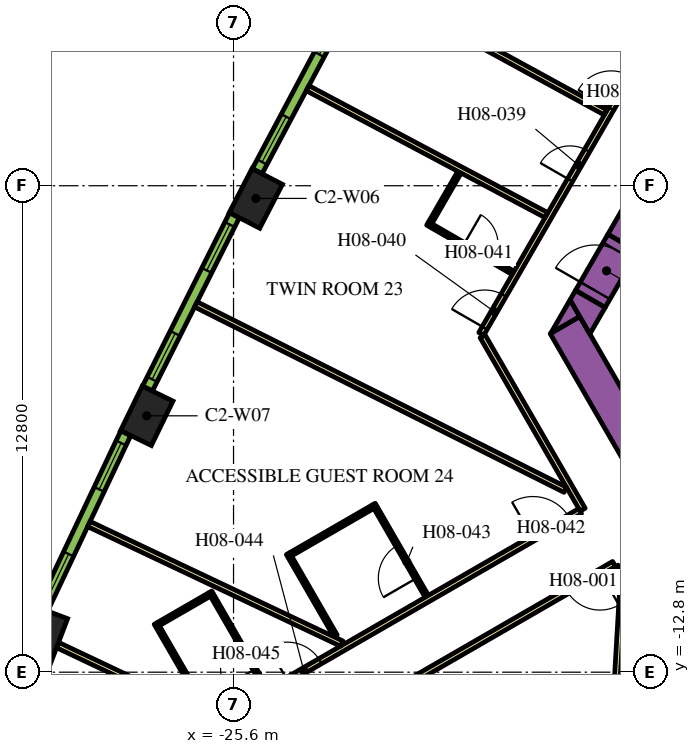
"""IFC4 building model, lengths in metres.
Left out: names, types, materials, properties, quantities, classifications, styles, units other than length and angle.
Written with IfcOpenShell. Run it as: python <this file> out.ifc"""

import sys

from ifc_helpers import new_model, si_unit, direction, frame, frame_2d, origin, origin_2d, place, context, subcontext, project, spatial, polyline, rectangle, outline, extrude, element, fill, save


model = new_model("IFC4")
c1 = context("Model", 3, precision=1e-05, world=origin(), true_north=direction((0.0, 1.0)))
c2 = subcontext(c1, "Body", "Model", "MODEL_VIEW")
j1 = project(units=[si_unit("LENGTHUNIT", "METRE"), si_unit("PLANEANGLEUNIT", "RADIAN")], contexts=[c1])
p1 = place(None, origin())
s1 = spatial("IfcSite", under=j1, at=p1, CompositionType="ELEMENT")
p2 = place(p1, origin())
s2 = spatial("IfcBuilding", under=s1, at=p2, CompositionType="ELEMENT")
p3 = place(p2, frame((0.0, 0.0, 114.9)))
s3 = spatial("IfcBuildingStorey", under=s2, at=p3, CompositionType="ELEMENT", Elevation=114.9)
for number, where, z_axis, x_axis in (
    (1, (-25.012, -0.334, 0.0), (0.0, 0.0, 1.0), (-0.459, -0.888, 0.0)),
    (2, (-27.883, -6.054, 0.0), (0.0, 0.0, 1.0), (-0.438, -0.899, 0.0)),
    (3, (-30.619, -11.839, 0.0), (0.0, 0.0, 1.0), (-0.355, -0.935, 0.0)),
):
    element("IfcColumn", number, at=place(p3, frame(where, z_axis=z_axis, x_axis=x_axis)), inside=s3, PredefinedType="COLUMN", context=c2, shape_type="SweptSolid", body=[
        extrude(rectangle(XDim=1.3, YDim=0.9, at=origin_2d()), origin(), (0.0, 0.0, 1.0), 3.9),
    ])
p4 = place(p3, frame((-15.36, -1.503, 0.0), z_axis=(0.0, 0.0, 1.0), x_axis=(0.50000389221, 0.866023156604, 0.0)))
e4 = element("IfcWall", 4, at=p4, inside=s3, PredefinedType="SOLIDWALL", context=c2, shape_type="SweptSolid", body=[
    extrude(rectangle(XDim=21.0, YDim=0.9, at=frame_2d((10.5, 0.0))), origin(), (0.0, 0.0, 1.0), 3.9),
])
p5 = place(p3, frame((-12.134, -11.883, 0.0), z_axis=(0.0, 0.0, 1.0), x_axis=(-0.500005339912, 0.866022320763, 0.0)))
e5 = element("IfcWall", 5, at=p5, inside=s3, PredefinedType="SOLIDWALL", context=c2, shape_type="SweptSolid", body=[
    extrude(rectangle(XDim=9.488, YDim=0.9, at=frame_2d((4.744, 0.0))), origin(), (0.0, 0.0, 1.0), 3.9),
])
p6 = place(p3, origin())
e6 = element("IfcWall", 6, at=p6, inside=s3, PredefinedType="SOLIDWALL", context=c2, shape_type="SweptSolid", body=[
    extrude(outline(polyline([(-16.489, -3.44), (-17.251, -3.88), (-16.743, -3.0), (-16.489, -3.44)])), origin(), (0.0, 0.0, 1.0), 3.9),
])
e7 = element("IfcWall", 7, at=p6, inside=s3, PredefinedType="SOLIDWALL", context=c2, shape_type="SweptSolid", body=[
    extrude(outline(polyline([(-15.82, -3.201), (-16.223, -3.9), (-16.743, -3.0), (-16.599, -2.751), (-15.82, -3.201)])), origin(), (0.0, 0.0, 1.0), 3.9),
])
p7 = place(p3, frame((-16.209, -2.976, 0.0), z_axis=(0.0, 0.0, 1.0), x_axis=(0.499954529098, 0.86605165483, 0.0)))
e8 = element("IfcWall", 8, at=p7, inside=s3, PredefinedType="SOLIDWALL", context=c2, shape_type="SweptSolid", body=[
    extrude(rectangle(XDim=1.7, YDim=0.9, at=frame_2d((0.85, 0.0))), origin(), (0.0, 0.0, 1.0), 3.9),
])
p8 = place(p7, frame((0.25, 0.0, 0.0)))
e9 = element("IfcOpeningElement", 9, at=p8, cuts=e8, PredefinedType="OPENING", context=c2, shape_type="SweptSolid", body=[
    extrude(rectangle(XDim=1.2, YDim=2.1, at=frame_2d((0.6, 1.05))), frame((0.0, 0.46, 0.0), z_axis=(0.0, -1.0, 0.0), x_axis=(1.0, 0.0, 0.0)), (0.0, 0.0, 1.0), 0.92),
])
p9 = place(p3, frame((-19.081, -3.9, 0.0), z_axis=(0.0, 0.0, 1.0), x_axis=(0.499998313975, 0.866026377209, 0.0)))
e10 = element("IfcWall", 10, at=p9, inside=s3, PredefinedType="PARTITIONING", context=c2, shape_type="SweptSolid", body=[
    extrude(rectangle(XDim=25.766, YDim=0.15, at=frame_2d((12.883, 0.0))), origin(), (0.0, 0.0, 1.0), 2.75),
])
p10 = place(p9, frame((19.306, 0.0, 0.0)))
e11 = element("IfcOpeningElement", 11, at=p10, cuts=e10, PredefinedType="OPENING", context=c2, shape_type="SweptSolid", body=[
    extrude(rectangle(XDim=1.0, YDim=2.1, at=frame_2d((0.5, 1.05))), frame((0.0, 0.085, 0.0), z_axis=(0.0, -1.0, 0.0), x_axis=(1.0, 0.0, 0.0)), (0.0, 0.0, 1.0), 0.17),
])
p11 = place(p9, frame((18.0, 0.0, 0.0)))
e12 = element("IfcOpeningElement", 12, at=p11, cuts=e10, PredefinedType="OPENING", context=c2, shape_type="SweptSolid", body=[
    extrude(rectangle(XDim=1.0, YDim=2.1, at=frame_2d((0.5, 1.05))), frame((0.0, 0.085, 0.0), z_axis=(0.0, -1.0, 0.0), x_axis=(1.0, 0.0, 0.0)), (0.0, 0.0, 1.0), 0.17),
])
p12 = place(p9, frame((6.838, 0.0, 0.0)))
e13 = element("IfcOpeningElement", 13, at=p12, cuts=e10, PredefinedType="OPENING", context=c2, shape_type="SweptSolid", body=[
    extrude(rectangle(XDim=1.0, YDim=2.1, at=frame_2d((0.5, 1.05))), frame((0.0, 0.085, 0.0), z_axis=(0.0, -1.0, 0.0), x_axis=(1.0, 0.0, 0.0)), (0.0, 0.0, 1.0), 0.17),
])
p13 = place(p9, frame((4.674, 0.0, 0.0)))
e14 = element("IfcOpeningElement", 14, at=p13, cuts=e10, PredefinedType="OPENING", context=c2, shape_type="SweptSolid", body=[
    extrude(rectangle(XDim=0.9, YDim=2.1, at=frame_2d((0.45, 1.05))), frame((0.0, 0.085, 0.0), z_axis=(0.0, -1.0, 0.0), x_axis=(1.0, 0.0, 0.0)), (0.0, 0.0, 1.0), 0.17),
])
p14 = place(p9, frame((0.18, 0.0, 0.0)))
e15 = element("IfcOpeningElement", 15, at=p14, cuts=e10, PredefinedType="OPENING", context=c2, shape_type="SweptSolid", body=[
    extrude(rectangle(XDim=1.0, YDim=2.1, at=frame_2d((0.5, 1.05))), frame((0.0, 0.085, 0.0), z_axis=(0.0, -1.0, 0.0), x_axis=(1.0, 0.0, 0.0)), (0.0, 0.0, 1.0), 0.17),
])
p15 = place(p3, frame((-16.412, -8.523, 0.0), z_axis=(0.0, 0.0, 1.0), x_axis=(-0.500001929737, 0.866024289647, 0.0)))
e16 = element("IfcWall", 16, at=p15, inside=s3, PredefinedType="PARTITIONING", context=c2, shape_type="SweptSolid", body=[
    extrude(rectangle(XDim=5.268, YDim=0.15, at=frame_2d((2.634, 0.0))), origin(), (0.0, 0.0, 1.0), 2.75),
])
p16 = place(p3, frame((-28.211, -15.335, 0.0), z_axis=(0.0, 0.0, 1.0), x_axis=(0.866025884867, 0.49999916674, 0.0)))
e17 = element("IfcWall", 17, at=p16, inside=s3, PredefinedType="PARTITIONING", context=c2, shape_type="SweptSolid", body=[
    extrude(rectangle(XDim=13.543, YDim=0.15, at=frame_2d((6.772, 0.0))), origin(), (0.0, 0.0, 1.0), 2.75),
])
p17 = place(p16, frame((12.114, 0.0, 0.0)))
e18 = element("IfcOpeningElement", 18, at=p17, cuts=e17, PredefinedType="OPENING", context=c2, shape_type="SweptSolid", body=[
    extrude(rectangle(XDim=1.1, YDim=2.1, at=frame_2d((0.55, 1.05))), frame((0.0, 0.085, 0.0), z_axis=(0.0, -1.0, 0.0), x_axis=(1.0, 0.0, 0.0)), (0.0, 0.0, 1.0), 0.17),
])
p18 = place(p16, frame((4.65, 0.0, 0.0)))
e19 = element("IfcOpeningElement", 19, at=p18, cuts=e17, PredefinedType="OPENING", context=c2, shape_type="SweptSolid", body=[
    extrude(rectangle(XDim=1.0, YDim=2.1, at=frame_2d((0.5, 1.05))), frame((0.0, 0.085, 0.0), z_axis=(0.0, -1.0, 0.0), x_axis=(1.0, 0.0, 0.0)), (0.0, 0.0, 1.0), 0.17),
])
p19 = place(p3, frame((-15.587, -9.952, 0.0), z_axis=(0.0, 0.0, 1.0), x_axis=(-0.866017869832, -0.500013048961, 0.0)))
e20 = element("IfcWall", 20, at=p19, inside=s3, PredefinedType="PARTITIONING", context=c2, shape_type="SweptSolid", body=[
    extrude(rectangle(XDim=13.624, YDim=0.15, at=frame_2d((6.812, 0.0))), origin(), (0.0, 0.0, 1.0), 2.75),
])
p20 = place(p19, frame((0.427, 0.0, 0.0)))
e21 = element("IfcOpeningElement", 21, at=p20, cuts=e20, PredefinedType="OPENING", context=c2, shape_type="SweptSolid", body=[
    extrude(rectangle(XDim=1.0, YDim=2.1, at=frame_2d((0.5, 1.05))), frame((0.0, 0.085, 0.0), z_axis=(0.0, -1.0, 0.0), x_axis=(1.0, 0.0, 0.0)), (0.0, 0.0, 1.0), 0.17),
])
p21 = place(p3, frame((-12.918, -14.575, 0.0), z_axis=(0.0, 0.0, 1.0), x_axis=(-0.500009150678, 0.866020120573, 0.0)))
e22 = element("IfcWall", 22, at=p21, inside=s3, PredefinedType="PARTITIONING", context=c2, shape_type="SweptSolid", body=[
    extrude(rectangle(XDim=5.258, YDim=0.15, at=frame_2d((2.629, 0.0))), origin(), (0.0, 0.0, 1.0), 2.75),
])
p22 = place(p3, frame((-30.231, -12.085, 0.0), z_axis=(0.0, 0.0, 1.0), x_axis=(0.904001132572, -0.427530060122, 0.0)))
e23 = element("IfcWall", 23, at=p22, inside=s3, PredefinedType="PARTITIONING", context=c2, shape_type="SweptSolid", body=[
    extrude(rectangle(XDim=4.51, YDim=0.15, at=frame_2d((2.255, 0.0))), origin(), (0.0, 0.0, 1.0), 2.75),
])
p23 = place(p3, frame((-29.406, -8.901, 0.0), z_axis=(0.0, 0.0, 1.0), x_axis=(0.904002363742, -0.427527456836, 0.0)))
e24 = element("IfcWall", 24, at=p23, inside=s3, PredefinedType="PARTITIONING", context=c2, shape_type="SweptSolid", body=[
    extrude(rectangle(XDim=7.362, YDim=0.15, at=frame_2d((3.681, 0.0))), origin(), (0.0, 0.0, 1.0), 2.75),
])
p24 = place(p3, frame((-23.652, 2.567, 0.0), z_axis=(0.0, 0.0, 1.0), x_axis=(0.883019237957, -0.469336793144, 0.0)))
e25 = element("IfcWall", 25, at=p24, inside=s3, PredefinedType="PARTITIONING", context=c2, shape_type="SweptSolid", body=[
    extrude(rectangle(XDim=7.111, YDim=0.15, at=frame_2d((3.555, 0.0))), origin(), (0.0, 0.0, 1.0), 2.75),
])
p25 = place(p3, frame((-26.591, -3.122, 0.0), z_axis=(0.0, 0.0, 1.0), x_axis=(0.893766213273, -0.448533115847, 0.0)))
e26 = element("IfcWall", 26, at=p25, inside=s3, PredefinedType="PARTITIONING", context=c2, shape_type="SweptSolid", body=[
    extrude(rectangle(XDim=10.875, YDim=0.15, at=frame_2d((5.438, 0.0))), origin(), (0.0, 0.0, 1.0), 2.75),
])
p26 = place(p3, frame((-21.614, 5.102, 0.0), z_axis=(0.0, 0.0, 1.0), x_axis=(0.877484555087, -0.479604895287, 0.0)))
e27 = element("IfcWall", 27, at=p26, inside=s3, PredefinedType="PARTITIONING", context=c2, shape_type="SweptSolid", body=[
    extrude(rectangle(XDim=6.611, YDim=0.15, at=frame_2d((3.306, 0.0))), origin(), (0.0, 0.0, 1.0), 2.75),
])
p27 = place(p3, frame((-15.999, -21.467, 0.0), z_axis=(0.0, 0.0, 1.0), x_axis=(0.058411453297, 0.998292593443, 0.0)))
e28 = element("IfcWall", 28, at=p27, inside=s3, PredefinedType="PARTITIONING", context=c2, shape_type="SweptSolid", body=[
    extrude(rectangle(XDim=10.875, YDim=0.15, at=frame_2d((5.438, 0.0))), origin(), (0.0, 0.0, 1.0), 2.75),
])
p28 = place(p3, frame((-20.492, -0.994, 0.0), z_axis=(0.0, 0.0, 1.0), x_axis=(0.865997922154, -0.500047596559, 0.0)))
e29 = element("IfcWall", 29, at=p28, inside=s3, PredefinedType="PARTITIONING", context=c2, shape_type="SweptSolid", body=[
    extrude(rectangle(XDim=2.6, YDim=0.1, at=frame_2d((1.3, 0.0))), origin(), (0.0, 0.0, 1.0), 2.75),
])
p29 = place(p28, frame((1.1, 0.0, 0.0)))
e30 = element("IfcOpeningElement", 30, at=p29, cuts=e29, PredefinedType="OPENING", context=c2, shape_type="SweptSolid", body=[
    extrude(rectangle(XDim=0.9, YDim=2.1, at=frame_2d((0.45, 1.05))), frame((0.0, 0.06, 0.0), z_axis=(0.0, -1.0, 0.0), x_axis=(1.0, 0.0, 0.0)), (0.0, 0.0, 1.0), 0.12),
])
p30 = place(p3, frame((-20.424, -0.976, 0.0), z_axis=(0.0, 0.0, 1.0), x_axis=(0.500086174919, 0.865975644955, 0.0)))
e31 = element("IfcWall", 31, at=p30, inside=s3, PredefinedType="PARTITIONING", context=c2, shape_type="SweptSolid", body=[
    extrude(rectangle(XDim=1.53, YDim=0.1, at=frame_2d((0.765, 0.0))), origin(), (0.0, 0.0, 1.0), 2.75),
])
p31 = place(p3, frame((-20.515, -10.805, 0.0), z_axis=(0.0, 0.0, 1.0), x_axis=(-0.49994636267, 0.866056369097, 0.0)))
e32 = element("IfcWall", 32, at=p31, inside=s3, PredefinedType="PARTITIONING", context=c2, shape_type="SweptSolid", body=[
    extrude(rectangle(XDim=2.8, YDim=0.1, at=frame_2d((1.4, 0.0))), origin(), (0.0, 0.0, 1.0), 2.75),
])
p32 = place(p31, frame((0.55, 0.0, 0.0)))
e33 = element("IfcOpeningElement", 33, at=p32, cuts=e32, PredefinedType="OPENING", context=c2, shape_type="SweptSolid", body=[
    extrude(rectangle(XDim=1.0, YDim=2.1, at=frame_2d((0.5, 1.05))), frame((0.0, 0.06, 0.0), z_axis=(0.0, -1.0, 0.0), x_axis=(1.0, 0.0, 0.0)), (0.0, 0.0, 1.0), 0.12),
])
for number, where, z_axis, x_axis in (
    (34, (-21.933, -8.448, 0.0), (0.0, 0.0, 1.0), (-0.866, -0.5, 0.0)),
    (35, (-22.916, -11.845, 0.0), (0.0, 0.0, 1.0), (-0.5, 0.866, 0.0)),
):
    element("IfcWall", number, at=place(p3, frame(where, z_axis=z_axis, x_axis=x_axis)), inside=s3, PredefinedType="PARTITIONING", context=c2, shape_type="SweptSolid", body=[
        extrude(rectangle(XDim=2.5, YDim=0.1, at=frame_2d((1.25, 0.0))), origin(), (0.0, 0.0, 1.0), 2.75),
    ])
p33 = place(p3, frame((-24.74, -13.244, 0.0), z_axis=(0.0, 0.0, 1.0), x_axis=(-0.500037662692, 0.866003658127, 0.0)))
e36 = element("IfcWall", 36, at=p33, inside=s3, PredefinedType="PARTITIONING", context=c2, shape_type="SweptSolid", body=[
    extrude(rectangle(XDim=2.95, YDim=0.1, at=frame_2d((1.475, 0.0))), origin(), (0.0, 0.0, 1.0), 2.75),
])
p34 = place(p33, frame((0.6, 0.0, 0.0)))
e37 = element("IfcOpeningElement", 37, at=p34, cuts=e36, PredefinedType="OPENING", context=c2, shape_type="SweptSolid", body=[
    extrude(rectangle(XDim=0.9, YDim=2.1, at=frame_2d((0.45, 1.05))), frame((0.0, 0.06, 0.0), z_axis=(0.0, -1.0, 0.0), x_axis=(1.0, 0.0, 0.0)), (0.0, 0.0, 1.0), 0.12),
])
p35 = place(p3, frame((-26.233, -10.758, 0.0), z_axis=(0.0, 0.0, 1.0), x_axis=(-0.866043940782, -0.499967891604, 0.0)))
e38 = element("IfcWall", 38, at=p35, inside=s3, PredefinedType="PARTITIONING", context=c2, shape_type="SweptSolid", body=[
    extrude(rectangle(XDim=1.55, YDim=0.1, at=frame_2d((0.775, 0.0))), origin(), (0.0, 0.0, 1.0), 2.75),
])
p36 = place(p3, frame((-26.319, -13.81, 0.0), z_axis=(0.0, 0.0, 1.0), x_axis=(-0.499953715521, 0.866052124492, 0.0)))
e39 = element("IfcWall", 39, at=p36, inside=s3, PredefinedType="PARTITIONING", context=c2, shape_type="SweptSolid", body=[
    extrude(rectangle(XDim=2.65, YDim=0.1, at=frame_2d((1.325, 0.0))), origin(), (0.0, 0.0, 1.0), 2.75),
])
p37 = place(p3, frame((-22.583, 4.887, 0.0), z_axis=(0.0, 0.0, 1.0), x_axis=(-0.469323203119, -0.883026461106, 0.0)))
e40 = element("IfcWall", 40, at=p37, inside=s3, PredefinedType="SOLIDWALL", context=c2, shape_type="SweptSolid", body=[
    extrude(rectangle(XDim=5.101, YDim=0.29, at=frame_2d((2.55, 0.0))), origin(), (0.0, 0.0, 1.0), 3.65),
])
p38 = place(p37, frame((0.273, 0.0, 0.9)))
e41 = element("IfcOpeningElement", 41, at=p38, cuts=e40, PredefinedType="OPENING", context=c2, shape_type="SweptSolid", body=[
    extrude(rectangle(XDim=1.35, YDim=2.15, at=frame_2d((0.675, 1.075))), frame((0.0, 0.155, 0.0), z_axis=(0.0, -1.0, 0.0), x_axis=(1.0, 0.0, 0.0)), (0.0, 0.0, 1.0), 0.31),
])
p39 = place(p37, frame((3.478, 0.0, 0.9)))
e42 = element("IfcOpeningElement", 42, at=p39, cuts=e40, PredefinedType="OPENING", context=c2, shape_type="SweptSolid", body=[
    extrude(rectangle(XDim=1.35, YDim=2.15, at=frame_2d((0.675, 1.075))), frame((0.0, 0.155, 0.0), z_axis=(0.0, -1.0, 0.0), x_axis=(1.0, 0.0, 0.0)), (0.0, 0.0, 1.0), 0.31),
])
p40 = place(p3, frame((-25.576, -0.778, 0.0), z_axis=(0.0, 0.0, 1.0), x_axis=(-0.448534297211, -0.893765620409, 0.0)))
e43 = element("IfcWall", 43, at=p40, inside=s3, PredefinedType="SOLIDWALL", context=c2, shape_type="SweptSolid", body=[
    extrude(rectangle(XDim=5.1, YDim=0.29, at=frame_2d((2.55, 0.0))), origin(), (0.0, 0.0, 1.0), 3.65),
])
p41 = place(p40, frame((0.272, 0.0, 0.9)))
e44 = element("IfcOpeningElement", 44, at=p41, cuts=e43, PredefinedType="OPENING", context=c2, shape_type="SweptSolid", body=[
    extrude(rectangle(XDim=1.35, YDim=2.15, at=frame_2d((0.675, 1.075))), frame((0.0, 0.155, 0.0), z_axis=(0.0, -1.0, 0.0), x_axis=(1.0, 0.0, 0.0)), (0.0, 0.0, 1.0), 0.31),
])
p42 = place(p40, frame((3.478, 0.0, 0.9)))
e45 = element("IfcOpeningElement", 45, at=p42, cuts=e43, PredefinedType="OPENING", context=c2, shape_type="SweptSolid", body=[
    extrude(rectangle(XDim=1.35, YDim=2.15, at=frame_2d((0.675, 1.075))), frame((0.0, 0.155, 0.0), z_axis=(0.0, -1.0, 0.0), x_axis=(1.0, 0.0, 0.0)), (0.0, 0.0, 1.0), 0.31),
])
p43 = place(p3, frame((-28.436, -6.511, 0.0), z_axis=(0.0, 0.0, 1.0), x_axis=(-0.427543726596, -0.903994669148, 0.0)))
e46 = element("IfcWall", 46, at=p43, inside=s3, PredefinedType="SOLIDWALL", context=c2, shape_type="SweptSolid", body=[
    extrude(rectangle(XDim=5.107, YDim=0.29, at=frame_2d((2.553, 0.0))), origin(), (0.0, 0.0, 1.0), 3.65),
])
p44 = place(p43, frame((0.285, 0.0, 0.9)))
e47 = element("IfcOpeningElement", 47, at=p44, cuts=e46, PredefinedType="OPENING", context=c2, shape_type="SweptSolid", body=[
    extrude(rectangle(XDim=1.35, YDim=2.15, at=frame_2d((0.675, 1.075))), frame((0.0, 0.155, 0.0), z_axis=(0.0, -1.0, 0.0), x_axis=(1.0, 0.0, 0.0)), (0.0, 0.0, 1.0), 0.31),
])
p45 = place(p43, frame((3.516, 0.0, 0.9)))
e48 = element("IfcOpeningElement", 48, at=p45, cuts=e46, PredefinedType="OPENING", context=c2, shape_type="SweptSolid", body=[
    extrude(rectangle(XDim=1.35, YDim=2.15, at=frame_2d((0.675, 1.075))), frame((0.0, 0.155, 0.0), z_axis=(0.0, -1.0, 0.0), x_axis=(1.0, 0.0, 0.0)), (0.0, 0.0, 1.0), 0.31),
])
p46 = place(p8, origin())
e49 = element("IfcDoor", 49, at=p46, inside=s3, OperationType="SINGLE_SWING_LEFT", PredefinedType="DOOR", context=c2, shape_type="SweptSolid", body=[
    extrude(rectangle(XDim=1.2, YDim=2.1, at=frame_2d((0.6, 1.05))), frame((0.0, 0.025, 0.0), z_axis=(0.0, -1.0, 0.0), x_axis=(1.0, 0.0, 0.0)), (0.0, 0.0, 1.0), 0.05),
])
fill(e9, e49)
p47 = place(p20, origin())
e50 = element("IfcDoor", 50, at=p47, inside=s3, OperationType="SINGLE_SWING_LEFT", PredefinedType="DOOR", context=c2, shape_type="SweptSolid", body=[
    extrude(rectangle(XDim=1.0, YDim=2.1, at=frame_2d((0.5, 1.05))), frame((0.0, 0.025, 0.0), z_axis=(0.0, -1.0, 0.0), x_axis=(1.0, 0.0, 0.0)), (0.0, 0.0, 1.0), 0.05),
])
fill(e21, e50)
p48 = place(p12, origin())
e51 = element("IfcDoor", 51, at=p48, inside=s3, OperationType="SINGLE_SWING_LEFT", PredefinedType="DOOR", context=c2, shape_type="SweptSolid", body=[
    extrude(rectangle(XDim=1.0, YDim=2.1, at=frame_2d((0.5, 1.05))), frame((0.0, 0.025, 0.0), z_axis=(0.0, -1.0, 0.0), x_axis=(1.0, 0.0, 0.0)), (0.0, 0.0, 1.0), 0.05),
])
fill(e13, e51)
p49 = place(p13, origin())
e52 = element("IfcDoor", 52, at=p49, inside=s3, OperationType="SINGLE_SWING_RIGHT", PredefinedType="DOOR", context=c2, shape_type="SweptSolid", body=[
    extrude(rectangle(XDim=0.9, YDim=2.1, at=frame_2d((0.45, 1.05))), frame((0.0, 0.025, 0.0), z_axis=(0.0, -1.0, 0.0), x_axis=(1.0, 0.0, 0.0)), (0.0, 0.0, 1.0), 0.05),
])
fill(e14, e52)
p50 = place(p14, origin())
e53 = element("IfcDoor", 53, at=p50, inside=s3, OperationType="SINGLE_SWING_LEFT", PredefinedType="DOOR", context=c2, shape_type="SweptSolid", body=[
    extrude(rectangle(XDim=1.0, YDim=2.1, at=frame_2d((0.5, 1.05))), frame((0.0, 0.025, 0.0), z_axis=(0.0, -1.0, 0.0), x_axis=(1.0, 0.0, 0.0)), (0.0, 0.0, 1.0), 0.05),
])
fill(e15, e53)
p51 = place(p29, origin())
e54 = element("IfcDoor", 54, at=p51, inside=s3, OperationType="SINGLE_SWING_LEFT", PredefinedType="DOOR", context=c2, shape_type="SweptSolid", body=[
    extrude(rectangle(XDim=0.9, YDim=2.1, at=frame_2d((0.45, 1.05))), frame((0.0, 0.025, 0.0), z_axis=(0.0, -1.0, 0.0), x_axis=(1.0, 0.0, 0.0)), (0.0, 0.0, 1.0), 0.05),
])
fill(e30, e54)
p52 = place(p17, origin())
e55 = element("IfcDoor", 55, at=p52, inside=s3, OperationType="SINGLE_SWING_RIGHT", PredefinedType="DOOR", context=c2, shape_type="SweptSolid", body=[
    extrude(rectangle(XDim=1.1, YDim=2.1, at=frame_2d((0.55, 1.05))), frame((0.0, 0.025, 0.0), z_axis=(0.0, -1.0, 0.0), x_axis=(1.0, 0.0, 0.0)), (0.0, 0.0, 1.0), 0.05),
])
fill(e18, e55)
p53 = place(p32, origin())
e56 = element("IfcDoor", 56, at=p53, inside=s3, OperationType="SINGLE_SWING_RIGHT", PredefinedType="DOOR", context=c2, shape_type="SweptSolid", body=[
    extrude(rectangle(XDim=1.0, YDim=2.1, at=frame_2d((0.5, 1.05))), frame((0.0, 0.025, 0.0), z_axis=(0.0, -1.0, 0.0), x_axis=(1.0, 0.0, 0.0)), (0.0, 0.0, 1.0), 0.05),
])
fill(e33, e56)
p54 = place(p18, origin())
e57 = element("IfcDoor", 57, at=p54, inside=s3, OperationType="SINGLE_SWING_RIGHT", PredefinedType="DOOR", context=c2, shape_type="SweptSolid", body=[
    extrude(rectangle(XDim=1.0, YDim=2.1, at=frame_2d((0.5, 1.05))), frame((0.0, 0.025, 0.0), z_axis=(0.0, -1.0, 0.0), x_axis=(1.0, 0.0, 0.0)), (0.0, 0.0, 1.0), 0.05),
])
fill(e19, e57)
p55 = place(p34, origin())
e58 = element("IfcDoor", 58, at=p55, inside=s3, OperationType="SINGLE_SWING_LEFT", PredefinedType="DOOR", context=c2, shape_type="SweptSolid", body=[
    extrude(rectangle(XDim=0.9, YDim=2.1, at=frame_2d((0.45, 1.05))), frame((0.0, 0.025, 0.0), z_axis=(0.0, -1.0, 0.0), x_axis=(1.0, 0.0, 0.0)), (0.0, 0.0, 1.0), 0.05),
])
fill(e37, e58)
p56 = place(p38, origin())
e59 = element("IfcWindow", 59, at=p56, inside=s3, PartitioningType="DOUBLE_PANEL_VERTICAL", PredefinedType="WINDOW", context=c2, shape_type="SweptSolid", body=[
    extrude(rectangle(XDim=1.35, YDim=2.15, at=frame_2d((0.675, 1.075))), frame((0.0, 0.015, 0.0), z_axis=(0.0, -1.0, 0.0), x_axis=(1.0, 0.0, 0.0)), (0.0, 0.0, 1.0), 0.06),
])
fill(e41, e59)
p57 = place(p39, origin())
e60 = element("IfcWindow", 60, at=p57, inside=s3, PartitioningType="DOUBLE_PANEL_VERTICAL", PredefinedType="WINDOW", context=c2, shape_type="SweptSolid", body=[
    extrude(rectangle(XDim=1.35, YDim=2.15, at=frame_2d((0.675, 1.075))), frame((0.0, 0.015, 0.0), z_axis=(0.0, -1.0, 0.0), x_axis=(1.0, 0.0, 0.0)), (0.0, 0.0, 1.0), 0.06),
])
fill(e42, e60)
p58 = place(p41, origin())
e61 = element("IfcWindow", 61, at=p58, inside=s3, PartitioningType="DOUBLE_PANEL_VERTICAL", PredefinedType="WINDOW", context=c2, shape_type="SweptSolid", body=[
    extrude(rectangle(XDim=1.35, YDim=2.15, at=frame_2d((0.675, 1.075))), frame((0.0, 0.015, 0.0), z_axis=(0.0, -1.0, 0.0), x_axis=(1.0, 0.0, 0.0)), (0.0, 0.0, 1.0), 0.06),
])
fill(e44, e61)
p59 = place(p42, origin())
e62 = element("IfcWindow", 62, at=p59, inside=s3, PartitioningType="DOUBLE_PANEL_VERTICAL", PredefinedType="WINDOW", context=c2, shape_type="SweptSolid", body=[
    extrude(rectangle(XDim=1.35, YDim=2.15, at=frame_2d((0.675, 1.075))), frame((0.0, 0.015, 0.0), z_axis=(0.0, -1.0, 0.0), x_axis=(1.0, 0.0, 0.0)), (0.0, 0.0, 1.0), 0.06),
])
fill(e45, e62)
p60 = place(p44, origin())
e63 = element("IfcWindow", 63, at=p60, inside=s3, PartitioningType="DOUBLE_PANEL_VERTICAL", PredefinedType="WINDOW", context=c2, shape_type="SweptSolid", body=[
    extrude(rectangle(XDim=1.35, YDim=2.15, at=frame_2d((0.675, 1.075))), frame((0.0, 0.015, 0.0), z_axis=(0.0, -1.0, 0.0), x_axis=(1.0, 0.0, 0.0)), (0.0, 0.0, 1.0), 0.06),
])
fill(e47, e63)
p61 = place(p45, origin())
e64 = element("IfcWindow", 64, at=p61, inside=s3, PartitioningType="DOUBLE_PANEL_VERTICAL", PredefinedType="WINDOW", context=c2, shape_type="SweptSolid", body=[
    extrude(rectangle(XDim=1.35, YDim=2.15, at=frame_2d((0.675, 1.075))), frame((0.0, 0.015, 0.0), z_axis=(0.0, -1.0, 0.0), x_axis=(1.0, 0.0, 0.0)), (0.0, 0.0, 1.0), 0.06),
])
fill(e48, e64)
save(model, sys.argv[1])
